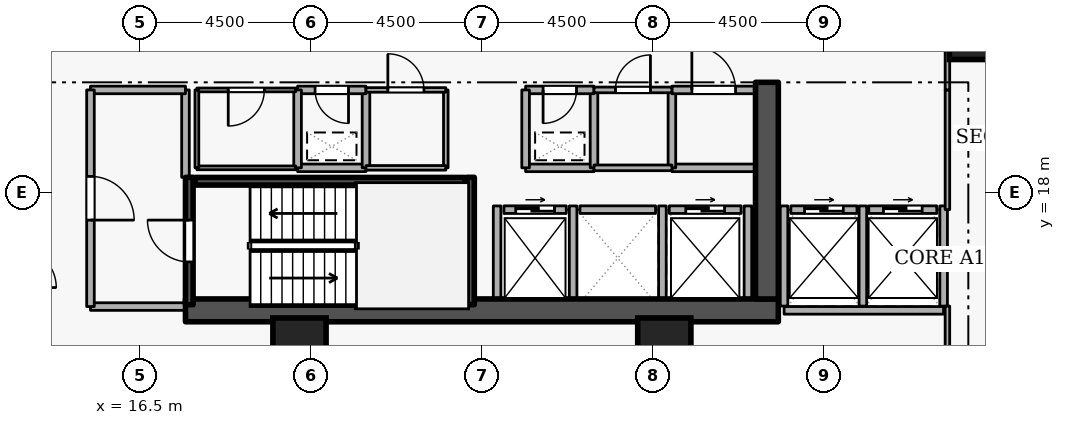
"""IFC4 building model, lengths in metres.
Left out: names, types, materials, properties, quantities, classifications, styles, units other than length and angle.
Written with IfcOpenShell. Run it as: python <this file> out.ifc"""

import sys

from ifc_helpers import new_model, si_unit, direction, frame, frame_2d, origin, origin_2d, place, context, subcontext, project, spatial, rectangle, extrude, element, fill, save


model = new_model("IFC4")
c1 = context("Model", 3, precision=1e-05, world=origin(), true_north=direction((0.0, 1.0)))
c2 = subcontext(c1, "Body", "Model", "MODEL_VIEW")
j1 = project(units=[si_unit("LENGTHUNIT", "METRE"), si_unit("PLANEANGLEUNIT", "RADIAN")], contexts=[c1])
p1 = place(None, origin())
s1 = spatial("IfcSite", under=j1, at=p1, CompositionType="ELEMENT")
p2 = place(p1, origin())
s2 = spatial("IfcBuilding", under=s1, at=p2, CompositionType="ELEMENT")
p3 = place(p2, frame((0.0, 0.0, 27.9)))
s3 = spatial("IfcBuildingStorey", under=s2, at=p3, CompositionType="ELEMENT", Elevation=27.9)
p4 = place(p3, frame((17.7, 14.9, 0.0), z_axis=(0.0, 0.0, 1.0), x_axis=(1.0, 0.0, 0.0)))
e1 = element("IfcWall", 1, at=p4, inside=s3, PredefinedType="SHEAR", context=c2, shape_type="SweptSolid", body=[
    extrude(rectangle(XDim=15.6, YDim=0.6, at=frame_2d((7.8, 0.0))), origin(), (0.0, 0.0, 1.0), 3.6),
])
p5 = place(p3, frame((33.0, 15.2, 0.0), z_axis=(0.0, 0.0, 1.0), x_axis=(0.0, 1.0, 0.0)))
e2 = element("IfcWall", 2, at=p5, inside=s3, PredefinedType="SHEAR", context=c2, shape_type="SweptSolid", body=[
    extrude(rectangle(XDim=5.7, YDim=0.6, at=frame_2d((2.85, 0.0))), origin(), (0.0, 0.0, 1.0), 3.6),
])
for number, where, z_axis, x_axis in (
    (3, (38.5, 22.2, 0.0), (0.0, 0.0, 1.0), (1.0, 0.0, 0.0)),
    (4, (20.7, 14.0, 0.0), (0.0, 0.0, 1.0), (1.0, 0.0, 0.0)),
    (5, (30.3, 14.0, 0.0), (0.0, 0.0, 1.0), (1.0, 0.0, 0.0)),
):
    element("IfcColumn", number, at=place(p3, frame(where, z_axis=z_axis, x_axis=x_axis)), inside=s3, PredefinedType="COLUMN", context=c2, shape_type="SweptSolid", body=[
        extrude(rectangle(XDim=1.4, YDim=1.4, at=origin_2d()), origin(), (0.0, 0.0, 1.0), 3.6),
    ])
p6 = place(p3, frame((26.08, 17.55, 0.0), z_axis=(0.0, 0.0, 1.0), x_axis=(1.0, 0.0, 0.0)))
e6 = element("IfcWall", 6, at=p6, inside=s3, PredefinedType="STANDARD", context=c2, shape_type="SweptSolid", body=[
    extrude(rectangle(XDim=1.64, YDim=0.2, at=frame_2d((0.82, 0.0))), origin(), (0.0, 0.0, 1.0), 3.34),
])
p7 = place(p6, frame((0.31, 0.0, 0.0)))
e7 = element("IfcOpeningElement", 7, at=p7, cuts=e6, PredefinedType="OPENING", context=c2, shape_type="SweptSolid", body=[
    extrude(rectangle(XDim=1.02, YDim=2.06, at=frame_2d((0.51, 1.03))), frame((0.0, 0.11, 0.0), z_axis=(0.0, -1.0, 0.0), x_axis=(1.0, 0.0, 0.0)), (0.0, 0.0, 1.0), 0.22),
])
p8 = place(p3, frame((28.08, 17.55, 0.0), z_axis=(0.0, 0.0, 1.0), x_axis=(1.0, 0.0, 0.0)))
e8 = element("IfcWall", 8, at=p8, inside=s3, PredefinedType="STANDARD", context=c2, shape_type="SweptSolid", body=[
    extrude(rectangle(XDim=1.99, YDim=0.2, at=frame_2d((0.995, 0.0))), origin(), (0.0, 0.0, 1.0), 3.34),
])
p9 = place(p3, frame((30.43, 17.55, 0.0), z_axis=(0.0, 0.0, 1.0), x_axis=(1.0, 0.0, 0.0)))
e9 = element("IfcWall", 9, at=p9, inside=s3, PredefinedType="STANDARD", context=c2, shape_type="SweptSolid", body=[
    extrude(rectangle(XDim=1.89, YDim=0.2, at=frame_2d((0.945, 0.0))), origin(), (0.0, 0.0, 1.0), 3.34),
])
p10 = place(p9, frame((0.435, 0.0, 0.0)))
e10 = element("IfcOpeningElement", 10, at=p10, cuts=e9, PredefinedType="OPENING", context=c2, shape_type="SweptSolid", body=[
    extrude(rectangle(XDim=1.02, YDim=2.06, at=frame_2d((0.51, 1.03))), frame((0.0, 0.11, 0.0), z_axis=(0.0, -1.0, 0.0), x_axis=(1.0, 0.0, 0.0)), (0.0, 0.0, 1.0), 0.22),
])
p11 = place(p3, frame((33.63, 17.55, 0.0), z_axis=(0.0, 0.0, 1.0), x_axis=(1.0, 0.0, 0.0)))
e11 = element("IfcWall", 11, at=p11, inside=s3, PredefinedType="STANDARD", context=c2, shape_type="SweptSolid", body=[
    extrude(rectangle(XDim=1.74, YDim=0.2, at=frame_2d((0.87, 0.0))), origin(), (0.0, 0.0, 1.0), 3.34),
])
p12 = place(p11, frame((0.36, 0.0, 0.0)))
e12 = element("IfcOpeningElement", 12, at=p12, cuts=e11, PredefinedType="OPENING", context=c2, shape_type="SweptSolid", body=[
    extrude(rectangle(XDim=1.02, YDim=2.06, at=frame_2d((0.51, 1.03))), frame((0.0, 0.11, 0.0), z_axis=(0.0, -1.0, 0.0), x_axis=(1.0, 0.0, 0.0)), (0.0, 0.0, 1.0), 0.22),
])
p13 = place(p3, frame((35.68, 17.55, 0.0), z_axis=(0.0, 0.0, 1.0), x_axis=(1.0, 0.0, 0.0)))
e13 = element("IfcWall", 13, at=p13, inside=s3, PredefinedType="STANDARD", context=c2, shape_type="SweptSolid", body=[
    extrude(rectangle(XDim=1.79, YDim=0.2, at=frame_2d((0.895, 0.0))), origin(), (0.0, 0.0, 1.0), 3.34),
])
p14 = place(p13, frame((0.385, 0.0, 0.0)))
e14 = element("IfcOpeningElement", 14, at=p14, cuts=e13, PredefinedType="OPENING", context=c2, shape_type="SweptSolid", body=[
    extrude(rectangle(XDim=1.02, YDim=2.06, at=frame_2d((0.51, 1.03))), frame((0.0, 0.11, 0.0), z_axis=(0.0, -1.0, 0.0), x_axis=(1.0, 0.0, 0.0)), (0.0, 0.0, 1.0), 0.22),
])
for number, where, z_axis, x_axis in (
    (15, (27.9, 15.212, 0.0), (0.0, 0.0, 1.0), (0.0, 1.0, 0.0)),
    (16, (25.9, 15.212, 0.0), (0.0, 0.0, 1.0), (0.0, 1.0, 0.0)),
    (17, (30.25, 15.212, 0.0), (0.0, 0.0, 1.0), (0.0, 1.0, 0.0)),
    (18, (32.5, 15.212, 0.0), (0.0, 0.0, 1.0), (0.0, 1.0, 0.0)),
):
    element("IfcWall", number, at=place(p3, frame(where, z_axis=z_axis, x_axis=x_axis)), inside=s3, PredefinedType="STANDARD", context=c2, shape_type="SweptSolid", body=[
        extrude(rectangle(XDim=2.436, YDim=0.2, at=frame_2d((1.218, 0.0))), origin(), (0.0, 0.0, 1.0), 3.34),
    ])
p15 = place(p3, frame((33.452, 14.9, 0.0), z_axis=(0.0, 0.0, 1.0), x_axis=(1.0, 0.0, 0.0)))
e19 = element("IfcWall", 19, at=p15, inside=s3, PredefinedType="STANDARD", context=c2, shape_type="SweptSolid", body=[
    extrude(rectangle(XDim=4.196, YDim=0.2, at=frame_2d((2.098, 0.0))), origin(), (0.0, 0.0, 1.0), 3.34),
])
for number, where, z_axis, x_axis in (
    (20, (35.525, 15.012, 0.0), (0.0, 0.0, 1.0), (0.0, 1.0, 0.0)),
    (21, (33.45, 15.012, 0.0), (0.0, 0.0, 1.0), (0.0, 1.0, 0.0)),
    (22, (37.65, 15.012, 0.0), (0.0, 0.0, 1.0), (0.0, 1.0, 0.0)),
):
    element("IfcWall", number, at=place(p3, frame(where, z_axis=z_axis, x_axis=x_axis)), inside=s3, PredefinedType="STANDARD", context=c2, shape_type="SweptSolid", body=[
        extrude(rectangle(XDim=2.636, YDim=0.2, at=frame_2d((1.318, 0.0))), origin(), (0.0, 0.0, 1.0), 3.34),
    ])
p16 = place(p3, frame((17.8, 15.05, 0.0), z_axis=(0.0, 0.0, 1.0), x_axis=(0.0, 1.0, 0.0)))
e23 = element("IfcWall", 23, at=p16, inside=s3, PredefinedType="SHEAR", context=c2, shape_type="SweptSolid", body=[
    extrude(rectangle(XDim=3.35, YDim=0.2, at=frame_2d((1.675, 0.0))), origin(), (0.0, 0.0, 1.0), 3.6),
])
p17 = place(p16, frame((1.125, 0.0, 0.0)))
e24 = element("IfcOpeningElement", 24, at=p17, cuts=e23, PredefinedType="OPENING", context=c2, shape_type="SweptSolid", body=[
    extrude(rectangle(XDim=1.1, YDim=2.1, at=frame_2d((0.55, 1.05))), frame((0.0, 0.11, 0.0), z_axis=(0.0, -1.0, 0.0), x_axis=(1.0, 0.0, 0.0)), (0.0, 0.0, 1.0), 0.22),
])
p18 = place(p3, frame((25.2, 18.4, 0.0), z_axis=(0.0, 0.0, 1.0), x_axis=(0.0, -1.0, 0.0)))
e25 = element("IfcWall", 25, at=p18, inside=s3, PredefinedType="SHEAR", context=c2, shape_type="SweptSolid", body=[
    extrude(rectangle(XDim=3.35, YDim=0.2, at=frame_2d((1.675, 0.0))), origin(), (0.0, 0.0, 1.0), 3.6),
])
p19 = place(p3, frame((25.05, 18.297, 0.0), z_axis=(0.0, 0.0, 1.0), x_axis=(-1.0, 0.0, 0.0)))
e26 = element("IfcWall", 26, at=p19, inside=s3, PredefinedType="SHEAR", context=c2, shape_type="SweptSolid", body=[
    extrude(rectangle(XDim=7.1, YDim=0.2, at=frame_2d((3.55, 0.0))), origin(), (0.0, 0.0, 1.0), 3.6),
])
p20 = place(p3, frame((15.2, 15.0, 0.0), z_axis=(0.0, 0.0, 1.0), x_axis=(1.0, 0.0, 0.0)))
e27 = element("IfcWall", 27, at=p20, inside=s3, PredefinedType="STANDARD", context=c2, shape_type="SweptSolid", body=[
    extrude(rectangle(XDim=2.5, YDim=0.2, at=frame_2d((1.25, 0.0))), origin(), (0.0, 0.0, 1.0), 3.34),
])
p21 = place(p3, frame((17.7, 18.4, 0.0), z_axis=(0.0, 0.0, 1.0), x_axis=(0.0, 1.0, 0.0)))
e28 = element("IfcWall", 28, at=p21, inside=s3, PredefinedType="STANDARD", context=c2, shape_type="SweptSolid", body=[
    extrude(rectangle(XDim=2.3, YDim=0.2, at=frame_2d((1.15, 0.0))), origin(), (0.0, 0.0, 1.0), 2.545),
])
p22 = place(p3, frame((17.7, 20.7, 0.0), z_axis=(0.0, 0.0, 1.0), x_axis=(-1.0, 0.0, 0.0)))
e29 = element("IfcWall", 29, at=p22, inside=s3, PredefinedType="STANDARD", context=c2, shape_type="SweptSolid", body=[
    extrude(rectangle(XDim=2.5, YDim=0.2, at=frame_2d((1.25, 0.0))), origin(), (0.0, 0.0, 1.0), 3.34),
])
p23 = place(p3, frame((15.2, 20.7, 0.0), z_axis=(0.0, 0.0, 1.0), x_axis=(0.0, -1.0, 0.0)))
e30 = element("IfcWall", 30, at=p23, inside=s3, PredefinedType="STANDARD", context=c2, shape_type="SweptSolid", body=[
    extrude(rectangle(XDim=5.7, YDim=0.2, at=frame_2d((2.85, 0.0))), origin(), (0.0, 0.0, 1.0), 3.34),
])
p24 = place(p23, frame((2.275, 0.0, 0.0)))
e31 = element("IfcOpeningElement", 31, at=p24, cuts=e30, PredefinedType="OPENING", context=c2, shape_type="SweptSolid", body=[
    extrude(rectangle(XDim=1.15, YDim=2.1, at=frame_2d((0.575, 1.05))), frame((0.0, 0.11, 0.0), z_axis=(0.0, -1.0, 0.0), x_axis=(1.0, 0.0, 0.0)), (0.0, 0.0, 1.0), 0.22),
])
p25 = place(p3, frame((26.65, 18.65, 0.0), z_axis=(0.0, 0.0, 1.0), x_axis=(1.0, 0.0, 0.0)))
e32 = element("IfcWall", 32, at=p25, inside=s3, PredefinedType="STANDARD", context=c2, shape_type="SweptSolid", body=[
    extrude(rectangle(XDim=1.8, YDim=0.2, at=frame_2d((0.9, 0.0))), origin(), (0.0, 0.0, 1.0), 3.34),
])
p26 = place(p3, frame((28.45, 18.65, 0.0), z_axis=(0.0, 0.0, 1.0), x_axis=(0.0, 1.0, 0.0)))
e33 = element("IfcWall", 33, at=p26, inside=s3, PredefinedType="STANDARD", context=c2, shape_type="SweptSolid", body=[
    extrude(rectangle(XDim=2.05, YDim=0.2, at=frame_2d((1.025, 0.0))), origin(), (0.0, 0.0, 1.0), 3.34),
])
p27 = place(p3, frame((28.45, 20.7, 0.0), z_axis=(0.0, 0.0, 1.0), x_axis=(-1.0, 0.0, 0.0)))
e34 = element("IfcWall", 34, at=p27, inside=s3, PredefinedType="STANDARD", context=c2, shape_type="SweptSolid", body=[
    extrude(rectangle(XDim=1.8, YDim=0.2, at=frame_2d((0.9, 0.0))), origin(), (0.0, 0.0, 1.0), 3.34),
])
p28 = place(p27, frame((0.46, 0.0, 0.0)))
e35 = element("IfcOpeningElement", 35, at=p28, cuts=e34, PredefinedType="OPENING", context=c2, shape_type="SweptSolid", body=[
    extrude(rectangle(XDim=0.88, YDim=2.04, at=frame_2d((0.44, 1.02))), frame((0.0, 0.11, 0.0), z_axis=(0.0, -1.0, 0.0), x_axis=(1.0, 0.0, 0.0)), (0.0, 0.0, 1.0), 0.22),
])
p29 = place(p3, frame((26.65, 20.7, 0.0), z_axis=(0.0, 0.0, 1.0), x_axis=(0.0, -1.0, 0.0)))
e36 = element("IfcWall", 36, at=p29, inside=s3, PredefinedType="STANDARD", context=c2, shape_type="SweptSolid", body=[
    extrude(rectangle(XDim=2.05, YDim=0.2, at=frame_2d((1.025, 0.0))), origin(), (0.0, 0.0, 1.0), 3.34),
])
p30 = place(p3, frame((20.65, 18.65, 0.0), z_axis=(0.0, 0.0, 1.0), x_axis=(1.0, 0.0, 0.0)))
e37 = element("IfcWall", 37, at=p30, inside=s3, PredefinedType="STANDARD", context=c2, shape_type="SweptSolid", body=[
    extrude(rectangle(XDim=1.8, YDim=0.2, at=frame_2d((0.9, 0.0))), origin(), (0.0, 0.0, 1.0), 3.34),
])
p31 = place(p3, frame((22.45, 18.65, 0.0), z_axis=(0.0, 0.0, 1.0), x_axis=(0.0, 1.0, 0.0)))
e38 = element("IfcWall", 38, at=p31, inside=s3, PredefinedType="STANDARD", context=c2, shape_type="SweptSolid", body=[
    extrude(rectangle(XDim=2.05, YDim=0.2, at=frame_2d((1.025, 0.0))), origin(), (0.0, 0.0, 1.0), 3.34),
])
p32 = place(p3, frame((22.45, 20.7, 0.0), z_axis=(0.0, 0.0, 1.0), x_axis=(-1.0, 0.0, 0.0)))
e39 = element("IfcWall", 39, at=p32, inside=s3, PredefinedType="STANDARD", context=c2, shape_type="SweptSolid", body=[
    extrude(rectangle(XDim=1.8, YDim=0.2, at=frame_2d((0.9, 0.0))), origin(), (0.0, 0.0, 1.0), 3.34),
])
p33 = place(p32, frame((0.46, 0.0, 0.0)))
e40 = element("IfcOpeningElement", 40, at=p33, cuts=e39, PredefinedType="OPENING", context=c2, shape_type="SweptSolid", body=[
    extrude(rectangle(XDim=0.88, YDim=2.04, at=frame_2d((0.44, 1.02))), frame((0.0, 0.11, 0.0), z_axis=(0.0, -1.0, 0.0), x_axis=(1.0, 0.0, 0.0)), (0.0, 0.0, 1.0), 0.22),
])
p34 = place(p3, frame((20.65, 20.7, 0.0), z_axis=(0.0, 0.0, 1.0), x_axis=(0.0, -1.0, 0.0)))
e41 = element("IfcWall", 41, at=p34, inside=s3, PredefinedType="STANDARD", context=c2, shape_type="SweptSolid", body=[
    extrude(rectangle(XDim=2.05, YDim=0.2, at=frame_2d((1.025, 0.0))), origin(), (0.0, 0.0, 1.0), 3.34),
])
p35 = place(p3, frame((32.7, 18.65, 0.0), z_axis=(0.0, 0.0, 1.0), x_axis=(-1.0, 0.0, 0.0)))
e42 = element("IfcWall", 42, at=p35, inside=s3, PredefinedType="STANDARD", context=c2, shape_type="SweptSolid", body=[
    extrude(rectangle(XDim=2.2, YDim=0.2, at=frame_2d((1.1, 0.0))), origin(), (0.0, 0.0, 1.0), 3.34),
])
p36 = place(p3, frame((30.5, 18.65, 0.0), z_axis=(0.0, 0.0, 1.0), x_axis=(0.0, 1.0, 0.0)))
e43 = element("IfcWall", 43, at=p36, inside=s3, PredefinedType="STANDARD", context=c2, shape_type="SweptSolid", body=[
    extrude(rectangle(XDim=2.05, YDim=0.2, at=frame_2d((1.025, 0.0))), origin(), (0.0, 0.0, 1.0), 3.34),
])
p37 = place(p3, frame((30.5, 20.7, 0.0), z_axis=(0.0, 0.0, 1.0), x_axis=(1.0, 0.0, 0.0)))
e44 = element("IfcWall", 44, at=p37, inside=s3, PredefinedType="STANDARD", context=c2, shape_type="SweptSolid", body=[
    extrude(rectangle(XDim=2.2, YDim=0.2, at=frame_2d((1.1, 0.0))), origin(), (0.0, 0.0, 1.0), 3.34),
])
p38 = place(p37, frame((0.525, 0.0, 0.0)))
e45 = element("IfcOpeningElement", 45, at=p38, cuts=e44, PredefinedType="OPENING", context=c2, shape_type="SweptSolid", body=[
    extrude(rectangle(XDim=1.15, YDim=2.1, at=frame_2d((0.575, 1.05))), frame((0.0, 0.11, 0.0), z_axis=(0.0, -1.0, 0.0), x_axis=(1.0, 0.0, 0.0)), (0.0, 0.0, 1.0), 0.22),
])
p39 = place(p3, frame((18.0, 18.65, 0.0), z_axis=(0.0, 0.0, 1.0), x_axis=(1.0, 0.0, 0.0)))
e46 = element("IfcWall", 46, at=p39, inside=s3, PredefinedType="PARTITIONING", context=c2, shape_type="SweptSolid", body=[
    extrude(rectangle(XDim=2.6, YDim=0.1, at=frame_2d((1.3, 0.0))), origin(), (0.0, 0.0, 1.0), 3.34),
])
p40 = place(p3, frame((20.6, 20.7, 0.0), z_axis=(0.0, 0.0, 1.0), x_axis=(-1.0, 0.0, 0.0)))
e47 = element("IfcWall", 47, at=p40, inside=s3, PredefinedType="PARTITIONING", context=c2, shape_type="SweptSolid", body=[
    extrude(rectangle(XDim=2.6, YDim=0.1, at=frame_2d((1.3, 0.0))), origin(), (0.0, 0.0, 1.0), 3.34),
])
p41 = place(p40, frame((0.825, 0.0, 0.0)))
e48 = element("IfcOpeningElement", 48, at=p41, cuts=e47, PredefinedType="OPENING", context=c2, shape_type="SweptSolid", body=[
    extrude(rectangle(XDim=0.95, YDim=2.1, at=frame_2d((0.475, 1.05))), frame((0.0, 0.06, 0.0), z_axis=(0.0, -1.0, 0.0), x_axis=(1.0, 0.0, 0.0)), (0.0, 0.0, 1.0), 0.12),
])
p42 = place(p3, frame((18.0, 20.7, 0.0), z_axis=(0.0, 0.0, 1.0), x_axis=(0.0, -1.0, 0.0)))
e49 = element("IfcWall", 49, at=p42, inside=s3, PredefinedType="PARTITIONING", context=c2, shape_type="SweptSolid", body=[
    extrude(rectangle(XDim=2.05, YDim=0.1, at=frame_2d((1.025, 0.0))), origin(), (0.0, 0.0, 1.0), 2.545),
])
p43 = place(p3, frame((24.55, 20.7, 0.0), z_axis=(0.0, 0.0, 1.0), x_axis=(0.0, -1.0, 0.0)))
e50 = element("IfcWall", 50, at=p43, inside=s3, PredefinedType="PARTITIONING", context=c2, shape_type="SweptSolid", body=[
    extrude(rectangle(XDim=2.05, YDim=0.12, at=frame_2d((1.025, 0.0))), origin(), (0.0, 0.0, 1.0), 3.34),
])
p44 = place(p3, frame((24.55, 18.65, 0.0), z_axis=(0.0, 0.0, 1.0), x_axis=(-1.0, 0.0, 0.0)))
e51 = element("IfcWall", 51, at=p44, inside=s3, PredefinedType="PARTITIONING", context=c2, shape_type="SweptSolid", body=[
    extrude(rectangle(XDim=2.1, YDim=0.12, at=frame_2d((1.05, 0.0))), origin(), (0.0, 0.0, 1.0), 3.34),
])
p45 = place(p3, frame((22.45, 20.7, 0.0), z_axis=(0.0, 0.0, 1.0), x_axis=(1.0, 0.0, 0.0)))
e52 = element("IfcWall", 52, at=p45, inside=s3, PredefinedType="PARTITIONING", context=c2, shape_type="SweptSolid", body=[
    extrude(rectangle(XDim=2.1, YDim=0.12, at=frame_2d((1.05, 0.0))), origin(), (0.0, 0.0, 1.0), 3.34),
])
p46 = place(p45, frame((0.575, 0.0, 0.0)))
e53 = element("IfcOpeningElement", 53, at=p46, cuts=e52, PredefinedType="OPENING", context=c2, shape_type="SweptSolid", body=[
    extrude(rectangle(XDim=0.95, YDim=2.1, at=frame_2d((0.475, 1.05))), frame((0.0, 0.07, 0.0), z_axis=(0.0, -1.0, 0.0), x_axis=(1.0, 0.0, 0.0)), (0.0, 0.0, 1.0), 0.14),
])
p47 = place(p3, frame((30.5, 18.65, 0.0), z_axis=(0.0, 0.0, 1.0), x_axis=(-1.0, 0.0, 0.0)))
e54 = element("IfcWall", 54, at=p47, inside=s3, PredefinedType="PARTITIONING", context=c2, shape_type="SweptSolid", body=[
    extrude(rectangle(XDim=2.05, YDim=0.15, at=frame_2d((1.025, 0.0))), origin(), (0.0, 0.0, 1.0), 3.34),
])
p48 = place(p3, frame((28.45, 20.7, 0.0), z_axis=(0.0, 0.0, 1.0), x_axis=(1.0, 0.0, 0.0)))
e55 = element("IfcWall", 55, at=p48, inside=s3, PredefinedType="PARTITIONING", context=c2, shape_type="SweptSolid", body=[
    extrude(rectangle(XDim=2.05, YDim=0.15, at=frame_2d((1.025, 0.0))), origin(), (0.0, 0.0, 1.0), 3.34),
])
p49 = place(p48, frame((0.565, 0.0, 0.0)))
e56 = element("IfcOpeningElement", 56, at=p49, cuts=e55, PredefinedType="OPENING", context=c2, shape_type="SweptSolid", body=[
    extrude(rectangle(XDim=0.92, YDim=2.08, at=frame_2d((0.46, 1.04))), frame((0.0, 0.085, 0.0), z_axis=(0.0, -1.0, 0.0), x_axis=(1.0, 0.0, 0.0)), (0.0, 0.0, 1.0), 0.17),
])
p50 = place(p3, frame((37.75, 17.55, 0.0), z_axis=(0.0, 0.0, 1.0), x_axis=(0.0, 1.0, 0.0)))
e57 = element("IfcWall", 57, at=p50, inside=s3, PredefinedType="PARTITIONING", context=c2, shape_type="SweptSolid", body=[
    extrude(rectangle(XDim=3.15, YDim=0.12, at=frame_2d((1.575, 0.0))), origin(), (0.0, 0.0, 1.0), 3.34),
])
p51 = place(p3, frame((37.75, 20.7, 0.0), z_axis=(0.0, 0.0, 1.0), x_axis=(0.0, 1.0, 0.0)))
e58 = element("IfcWall", 58, at=p51, inside=s3, PredefinedType="PARTITIONING", context=c2, shape_type="SweptSolid", body=[
    extrude(rectangle(XDim=1.85, YDim=0.12, at=frame_2d((0.925, 0.0))), origin(), (0.0, 0.0, 1.0), 3.34),
])
p52 = place(p3, frame((37.75, 13.15, 0.0), z_axis=(0.0, 0.0, 1.0), x_axis=(0.0, 1.0, 0.0)))
e59 = element("IfcWall", 59, at=p52, inside=s3, PredefinedType="PARTITIONING", context=c2, shape_type="SweptSolid", body=[
    extrude(rectangle(XDim=1.862, YDim=0.12, at=frame_2d((0.931, 0.0))), origin(), (0.0, 0.0, 1.0), 3.34),
])
p53 = place(p7, origin())
e60 = element("IfcDoor", 60, at=p53, inside=s3, OperationType="SLIDING_TO_LEFT", PredefinedType="DOOR", context=c2, shape_type="SweptSolid", body=[
    extrude(rectangle(XDim=1.02, YDim=2.06, at=frame_2d((0.51, 1.03))), frame((0.0, 0.025, 0.0), z_axis=(0.0, -1.0, 0.0), x_axis=(1.0, 0.0, 0.0)), (0.0, 0.0, 1.0), 0.05),
])
fill(e7, e60)
p54 = place(p10, origin())
e61 = element("IfcDoor", 61, at=p54, inside=s3, OperationType="SLIDING_TO_LEFT", PredefinedType="DOOR", context=c2, shape_type="SweptSolid", body=[
    extrude(rectangle(XDim=1.02, YDim=2.06, at=frame_2d((0.51, 1.03))), frame((0.0, 0.025, 0.0), z_axis=(0.0, -1.0, 0.0), x_axis=(1.0, 0.0, 0.0)), (0.0, 0.0, 1.0), 0.05),
])
fill(e10, e61)
p55 = place(p12, origin())
e62 = element("IfcDoor", 62, at=p55, inside=s3, OperationType="SLIDING_TO_LEFT", PredefinedType="DOOR", context=c2, shape_type="SweptSolid", body=[
    extrude(rectangle(XDim=1.02, YDim=2.06, at=frame_2d((0.51, 1.03))), frame((0.0, 0.025, 0.0), z_axis=(0.0, -1.0, 0.0), x_axis=(1.0, 0.0, 0.0)), (0.0, 0.0, 1.0), 0.05),
])
fill(e12, e62)
p56 = place(p14, origin())
e63 = element("IfcDoor", 63, at=p56, inside=s3, OperationType="SLIDING_TO_LEFT", PredefinedType="DOOR", context=c2, shape_type="SweptSolid", body=[
    extrude(rectangle(XDim=1.02, YDim=2.06, at=frame_2d((0.51, 1.03))), frame((0.0, 0.025, 0.0), z_axis=(0.0, -1.0, 0.0), x_axis=(1.0, 0.0, 0.0)), (0.0, 0.0, 1.0), 0.05),
])
fill(e14, e63)
p57 = place(p17, origin())
e64 = element("IfcDoor", 64, at=p57, inside=s3, OperationType="SINGLE_SWING_RIGHT", PredefinedType="DOOR", context=c2, shape_type="SweptSolid", body=[
    extrude(rectangle(XDim=1.1, YDim=2.1, at=frame_2d((0.55, 1.05))), frame((0.0, 0.025, 0.0), z_axis=(0.0, -1.0, 0.0), x_axis=(1.0, 0.0, 0.0)), (0.0, 0.0, 1.0), 0.05),
])
fill(e24, e64)
p58 = place(p24, origin())
e65 = element("IfcDoor", 65, at=p58, inside=s3, OperationType="SINGLE_SWING_RIGHT", PredefinedType="DOOR", context=c2, shape_type="SweptSolid", body=[
    extrude(rectangle(XDim=1.15, YDim=2.1, at=frame_2d((0.575, 1.05))), frame((0.0, 0.025, 0.0), z_axis=(0.0, -1.0, 0.0), x_axis=(1.0, 0.0, 0.0)), (0.0, 0.0, 1.0), 0.05),
])
fill(e31, e65)
p59 = place(p28, origin())
e66 = element("IfcDoor", 66, at=p59, inside=s3, OperationType="SINGLE_SWING_RIGHT", PredefinedType="DOOR", context=c2, shape_type="SweptSolid", body=[
    extrude(rectangle(XDim=0.88, YDim=2.04, at=frame_2d((0.44, 1.02))), frame((0.0, 0.025, 0.0), z_axis=(0.0, -1.0, 0.0), x_axis=(1.0, 0.0, 0.0)), (0.0, 0.0, 1.0), 0.05),
])
fill(e35, e66)
p60 = place(p33, origin())
e67 = element("IfcDoor", 67, at=p60, inside=s3, OperationType="SINGLE_SWING_LEFT", PredefinedType="DOOR", context=c2, shape_type="SweptSolid", body=[
    extrude(rectangle(XDim=0.88, YDim=2.04, at=frame_2d((0.44, 1.02))), frame((0.0, 0.025, 0.0), z_axis=(0.0, -1.0, 0.0), x_axis=(1.0, 0.0, 0.0)), (0.0, 0.0, 1.0), 0.05),
])
fill(e40, e67)
p61 = place(p41, origin())
e68 = element("IfcDoor", 68, at=p61, inside=s3, OperationType="SINGLE_SWING_RIGHT", PredefinedType="DOOR", context=c2, shape_type="SweptSolid", body=[
    extrude(rectangle(XDim=0.95, YDim=2.1, at=frame_2d((0.475, 1.05))), frame((0.0, 0.025, 0.0), z_axis=(0.0, -1.0, 0.0), x_axis=(1.0, 0.0, 0.0)), (0.0, 0.0, 1.0), 0.05),
])
fill(e48, e68)
p62 = place(p46, origin())
e69 = element("IfcDoor", 69, at=p62, inside=s3, OperationType="SINGLE_SWING_LEFT", PredefinedType="DOOR", context=c2, shape_type="SweptSolid", body=[
    extrude(rectangle(XDim=0.95, YDim=2.1, at=frame_2d((0.475, 1.05))), frame((0.0, 0.025, 0.0), z_axis=(0.0, -1.0, 0.0), x_axis=(1.0, 0.0, 0.0)), (0.0, 0.0, 1.0), 0.05),
])
fill(e53, e69)
p63 = place(p49, origin())
e70 = element("IfcDoor", 70, at=p63, inside=s3, OperationType="SINGLE_SWING_RIGHT", PredefinedType="DOOR", context=c2, shape_type="SweptSolid", body=[
    extrude(rectangle(XDim=0.92, YDim=2.08, at=frame_2d((0.46, 1.04))), frame((0.0, 0.025, 0.0), z_axis=(0.0, -1.0, 0.0), x_axis=(1.0, 0.0, 0.0)), (0.0, 0.0, 1.0), 0.05),
])
fill(e56, e70)
p64 = place(p38, origin())
e71 = element("IfcDoor", 71, at=p64, inside=s3, OperationType="SINGLE_SWING_LEFT", PredefinedType="DOOR", context=c2, shape_type="SweptSolid", body=[
    extrude(rectangle(XDim=1.15, YDim=2.1, at=frame_2d((0.575, 1.05))), frame((0.0, 0.025, 0.0), z_axis=(0.0, -1.0, 0.0), x_axis=(1.0, 0.0, 0.0)), (0.0, 0.0, 1.0), 0.05),
])
fill(e45, e71)
save(model, sys.argv[1])
